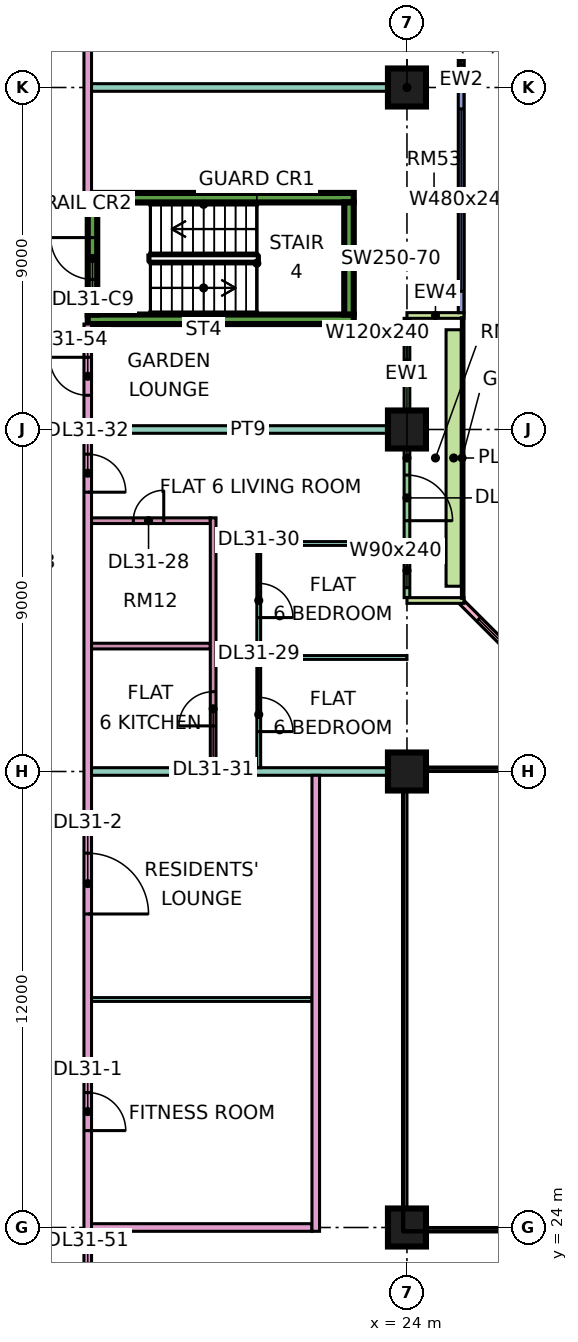
"""IFC4 building model, lengths in metres.
Left out: names, types, materials, properties, quantities, classifications, styles, units other than length and angle.
Written with IfcOpenShell. Run it as: python <this file> out.ifc"""

import sys

from ifc_helpers import new_model, si_unit, direction, frame, frame_2d, origin, origin_2d, place, context, subcontext, project, spatial, rectangle, extrude, element, fill, save


model = new_model("IFC4")
c1 = context("Model", 3, precision=1e-05, world=origin(), true_north=direction((0.0, 1.0)))
c2 = subcontext(c1, "Body", "Model", "MODEL_VIEW")
j1 = project(units=[si_unit("LENGTHUNIT", "METRE"), si_unit("PLANEANGLEUNIT", "RADIAN")], contexts=[c1])
p1 = place(None, origin())
s1 = spatial("IfcSite", under=j1, at=p1, CompositionType="ELEMENT")
p2 = place(p1, origin())
s2 = spatial("IfcBuilding", under=s1, at=p2, CompositionType="ELEMENT")
p3 = place(p2, frame((0.0, 0.0, 133.15)))
s3 = spatial("IfcBuildingStorey", under=s2, at=p3, CompositionType="ELEMENT", Elevation=133.15)
for number, where, z_axis, x_axis in (
    (1, (24.0, 24.0, 0.0), (0.0, 0.0, 1.0), (1.0, 0.0, 0.0)),
    (2, (24.0, 36.0, 0.0), (0.0, 0.0, 1.0), (1.0, 0.0, 0.0)),
    (3, (24.0, 45.0, 0.0), (0.0, 0.0, 1.0), (1.0, 0.0, 0.0)),
    (4, (24.0, 54.0, 0.0), (0.0, 0.0, 1.0), (1.0, 0.0, 0.0)),
):
    element("IfcColumn", number, at=place(p3, frame(where, z_axis=z_axis, x_axis=x_axis)), inside=s3, PredefinedType="COLUMN", context=c2, shape_type="SweptSolid", body=[
        extrude(rectangle(XDim=1.0, YDim=1.0, at=origin_2d()), origin(), (0.0, 0.0, 1.0), 3.75),
    ])
for number, where, z_axis, x_axis in (
    (5, (15.6, 47.9, 0.0), (0.0, 0.0, 1.0), (1.0, 0.0, 0.0)),
    (6, (15.6, 51.1, 0.0), (0.0, 0.0, 1.0), (1.0, 0.0, 0.0)),
):
    element("IfcWall", number, at=place(p3, frame(where, z_axis=z_axis, x_axis=x_axis)), inside=s3, PredefinedType="SHEAR", context=c2, shape_type="SweptSolid", body=[
        extrude(rectangle(XDim=7.0, YDim=0.25, at=frame_2d((3.5, 0.0))), origin(), (0.0, 0.0, 1.0), 3.75),
    ])
p4 = place(p3, frame((15.725, 48.025, 0.0), z_axis=(0.0, 0.0, 1.0), x_axis=(0.0, 1.0, 0.0)))
e7 = element("IfcWall", 7, at=p4, inside=s3, PredefinedType="SHEAR", context=c2, shape_type="SweptSolid", body=[
    extrude(rectangle(XDim=2.95, YDim=0.25, at=frame_2d((1.475, 0.0))), origin(), (0.0, 0.0, 1.0), 3.75),
])
p5 = place(p4, frame((0.925, 0.0, 0.0)))
e8 = element("IfcOpeningElement", 8, at=p5, cuts=e7, PredefinedType="OPENING", context=c2, shape_type="SweptSolid", body=[
    extrude(rectangle(XDim=1.1, YDim=2.2, at=frame_2d((0.55, 1.1))), frame((0.0, 0.135, 0.0), z_axis=(0.0, -1.0, 0.0), x_axis=(1.0, 0.0, 0.0)), (0.0, 0.0, 1.0), 0.27),
])
p6 = place(p3, frame((22.475, 48.025, 0.0), z_axis=(0.0, 0.0, 1.0), x_axis=(0.0, 1.0, 0.0)))
e9 = element("IfcWall", 9, at=p6, inside=s3, PredefinedType="SHEAR", context=c2, shape_type="SweptSolid", body=[
    extrude(rectangle(XDim=2.95, YDim=0.25, at=frame_2d((1.475, 0.0))), origin(), (0.0, 0.0, 1.0), 3.75),
])
p7 = place(p3, frame((28.447, 37.447, 0.0), z_axis=(0.0, 0.0, 1.0), x_axis=(-0.707106781187, 0.707106781187, 0.0)))
e10 = element("IfcWall", 10, at=p7, inside=s3, PredefinedType="SOLIDWALL", context=c2, shape_type="SweptSolid", body=[
    extrude(rectangle(XDim=4.243, YDim=0.15, at=frame_2d((2.121, 0.0))), origin(), (0.0, 0.0, 1.0), 3.35),
])
p8 = place(p7, frame((0.621, 0.0, 0.45)))
e11 = element("IfcOpeningElement", 11, at=p8, cuts=e10, PredefinedType="OPENING", context=c2, shape_type="SweptSolid", body=[
    extrude(rectangle(XDim=3.0, YDim=2.4, at=frame_2d((1.5, 1.2))), frame((0.0, 0.085, 0.0), z_axis=(0.0, -1.0, 0.0), x_axis=(1.0, 0.0, 0.0)), (0.0, 0.0, 1.0), 0.17),
])
p9 = place(p3, frame((24.0, 40.575, 0.0), z_axis=(0.0, 0.0, 1.0), x_axis=(0.0, 1.0, 0.0)))
e12 = element("IfcWall", 12, at=p9, inside=s3, PredefinedType="SOLIDWALL", context=c2, shape_type="SweptSolid", body=[
    extrude(rectangle(XDim=7.35, YDim=0.15, at=frame_2d((3.675, 0.0))), origin(), (0.0, 0.0, 1.0), 3.35),
])
p10 = place(p9, frame((0.262, 0.0, 0.45)))
e13 = element("IfcOpeningElement", 13, at=p10, cuts=e12, PredefinedType="OPENING", context=c2, shape_type="SweptSolid", body=[
    extrude(rectangle(XDim=0.9, YDim=2.4, at=frame_2d((0.45, 1.2))), frame((0.0, 0.085, 0.0), z_axis=(0.0, -1.0, 0.0), x_axis=(1.0, 0.0, 0.0)), (0.0, 0.0, 1.0), 0.17),
])
p11 = place(p9, frame((2.025, 0.0, 0.0)))
e14 = element("IfcOpeningElement", 14, at=p11, cuts=e12, PredefinedType="OPENING", context=c2, shape_type="SweptSolid", body=[
    extrude(rectangle(XDim=1.2, YDim=2.4, at=frame_2d((0.6, 1.2))), frame((0.0, 0.085, 0.0), z_axis=(0.0, -1.0, 0.0), x_axis=(1.0, 0.0, 0.0)), (0.0, 0.0, 1.0), 0.17),
])
p12 = place(p9, frame((5.587, 0.0, 0.45)))
e15 = element("IfcOpeningElement", 15, at=p12, cuts=e12, PredefinedType="OPENING", context=c2, shape_type="SweptSolid", body=[
    extrude(rectangle(XDim=1.2, YDim=2.4, at=frame_2d((0.6, 1.2))), frame((0.0, 0.085, 0.0), z_axis=(0.0, -1.0, 0.0), x_axis=(1.0, 0.0, 0.0)), (0.0, 0.0, 1.0), 0.17),
])
for number, where, z_axis, x_axis in (
    (16, (25.5, 40.5, 0.0), (0.0, 0.0, 1.0), (-1.0, 0.0, 0.0)),
    (17, (25.5, 48.0, 0.0), (0.0, 0.0, 1.0), (-1.0, 0.0, 0.0)),
):
    element("IfcWall", number, at=place(p3, frame(where, z_axis=z_axis, x_axis=x_axis)), inside=s3, PredefinedType="SOLIDWALL", context=c2, shape_type="SweptSolid", body=[
        extrude(rectangle(XDim=1.5, YDim=0.15, at=frame_2d((0.75, 0.0))), origin(), (0.0, 0.0, 1.0), 3.35),
    ])
p13 = place(p3, frame((25.425, 48.075, 0.0), z_axis=(0.0, 0.0, 1.0), x_axis=(0.0, 1.0, 0.0)))
e18 = element("IfcWall", 18, at=p13, inside=s3, PredefinedType="SOLIDWALL", context=c2, shape_type="SweptSolid", body=[
    extrude(rectangle(XDim=13.425, YDim=0.15, at=frame_2d((6.712, 0.0))), origin(), (0.0, 0.0, 1.0), 3.35),
])
p14 = place(p13, frame((0.562, 0.0, 0.45)))
e19 = element("IfcOpeningElement", 19, at=p14, cuts=e18, PredefinedType="OPENING", context=c2, shape_type="SweptSolid", body=[
    extrude(rectangle(XDim=4.8, YDim=2.4, at=frame_2d((2.4, 1.2))), frame((0.0, 0.085, 0.0), z_axis=(0.0, -1.0, 0.0), x_axis=(1.0, 0.0, 0.0)), (0.0, 0.0, 1.0), 0.17),
])
p15 = place(p13, frame((6.525, 0.0, 0.45)))
e20 = element("IfcOpeningElement", 20, at=p15, cuts=e18, PredefinedType="OPENING", context=c2, shape_type="SweptSolid", body=[
    extrude(rectangle(XDim=1.8, YDim=2.4, at=frame_2d((0.9, 1.2))), frame((0.0, 0.085, 0.0), z_axis=(0.0, -1.0, 0.0), x_axis=(1.0, 0.0, 0.0)), (0.0, 0.0, 1.0), 0.17),
])
p16 = place(p13, frame((9.525, 0.0, 0.45)))
e21 = element("IfcOpeningElement", 21, at=p16, cuts=e18, PredefinedType="OPENING", context=c2, shape_type="SweptSolid", body=[
    extrude(rectangle(XDim=1.8, YDim=2.4, at=frame_2d((0.9, 1.2))), frame((0.0, 0.085, 0.0), z_axis=(0.0, -1.0, 0.0), x_axis=(1.0, 0.0, 0.0)), (0.0, 0.0, 1.0), 0.17),
])
p17 = place(p13, frame((12.225, 0.0, 0.45)))
e22 = element("IfcOpeningElement", 22, at=p17, cuts=e18, PredefinedType="OPENING", context=c2, shape_type="SweptSolid", body=[
    extrude(rectangle(XDim=0.9, YDim=2.4, at=frame_2d((0.45, 1.2))), frame((0.0, 0.085, 0.0), z_axis=(0.0, -1.0, 0.0), x_axis=(1.0, 0.0, 0.0)), (0.0, 0.0, 1.0), 0.17),
])
p18 = place(p3, frame((25.229, 40.875, 0.0), z_axis=(0.0, 0.0, 1.0), x_axis=(0.0, 1.0, 0.0)))
e23 = element("IfcWall", 23, at=p18, inside=s3, PredefinedType="SOLIDWALL", context=c2, shape_type="SweptSolid", body=[
    extrude(rectangle(XDim=6.75, YDim=0.4, at=frame_2d((3.375, 0.0))), origin(), (0.0, 0.0, 1.0), 0.7),
])
p19 = place(p3, frame((15.6, 20.0, 0.0), z_axis=(0.0, 0.0, 1.0), x_axis=(0.0, 1.0, 0.0)))
e24 = element("IfcWall", 24, at=p19, inside=s3, PredefinedType="PARTITIONING", context=c2, shape_type="SweptSolid", body=[
    extrude(rectangle(XDim=27.775, YDim=0.2, at=frame_2d((13.887, 0.0))), origin(), (0.0, 0.0, 1.0), 3.35),
])
p20 = place(p19, frame((6.55, 0.0, 0.0)))
e25 = element("IfcOpeningElement", 25, at=p20, cuts=e24, PredefinedType="OPENING", context=c2, shape_type="SweptSolid", body=[
    extrude(rectangle(XDim=1.0, YDim=2.1, at=frame_2d((0.5, 1.05))), frame((0.0, 0.11, 0.0), z_axis=(0.0, -1.0, 0.0), x_axis=(1.0, 0.0, 0.0)), (0.0, 0.0, 1.0), 0.22),
])
p21 = place(p19, frame((12.25, 0.0, 0.0)))
e26 = element("IfcOpeningElement", 26, at=p21, cuts=e24, PredefinedType="OPENING", context=c2, shape_type="SweptSolid", body=[
    extrude(rectangle(XDim=1.6, YDim=2.1, at=frame_2d((0.8, 1.05))), frame((0.0, 0.11, 0.0), z_axis=(0.0, -1.0, 0.0), x_axis=(1.0, 0.0, 0.0)), (0.0, 0.0, 1.0), 0.22),
])
p22 = place(p19, frame((23.35, 0.0, 0.0)))
e27 = element("IfcOpeningElement", 27, at=p22, cuts=e24, PredefinedType="OPENING", context=c2, shape_type="SweptSolid", body=[
    extrude(rectangle(XDim=1.0, YDim=2.1, at=frame_2d((0.5, 1.05))), frame((0.0, 0.11, 0.0), z_axis=(0.0, -1.0, 0.0), x_axis=(1.0, 0.0, 0.0)), (0.0, 0.0, 1.0), 0.22),
])
p23 = place(p19, frame((1.15, 0.0, 0.0)))
e28 = element("IfcOpeningElement", 28, at=p23, cuts=e24, PredefinedType="OPENING", context=c2, shape_type="SweptSolid", body=[
    extrude(rectangle(XDim=1.8, YDim=2.1, at=frame_2d((0.9, 1.05))), frame((0.0, 0.11, 0.0), z_axis=(0.0, -1.0, 0.0), x_axis=(1.0, 0.0, 0.0)), (0.0, 0.0, 1.0), 0.22),
])
p24 = place(p19, frame((25.9, 0.0, 0.0)))
e29 = element("IfcOpeningElement", 29, at=p24, cuts=e24, PredefinedType="OPENING", context=c2, shape_type="SweptSolid", body=[
    extrude(rectangle(XDim=1.0, YDim=2.1, at=frame_2d((0.5, 1.05))), frame((0.0, 0.11, 0.0), z_axis=(0.0, -1.0, 0.0), x_axis=(1.0, 0.0, 0.0)), (0.0, 0.0, 1.0), 0.22),
])
p25 = place(p3, frame((15.6, 51.225, 0.0), z_axis=(0.0, 0.0, 1.0), x_axis=(0.0, 1.0, 0.0)))
e30 = element("IfcWall", 30, at=p25, inside=s3, PredefinedType="PARTITIONING", context=c2, shape_type="SweptSolid", body=[
    extrude(rectangle(XDim=11.701, YDim=0.2, at=frame_2d((5.851, 0.0))), origin(), (0.0, 0.0, 1.0), 3.35),
])
p26 = place(p25, frame((3.825, 0.0, 0.0)))
e31 = element("IfcOpeningElement", 31, at=p26, cuts=e30, PredefinedType="OPENING", context=c2, shape_type="SweptSolid", body=[
    extrude(rectangle(XDim=1.0, YDim=2.1, at=frame_2d((0.5, 1.05))), frame((0.0, 0.11, 0.0), z_axis=(0.0, -1.0, 0.0), x_axis=(1.0, 0.0, 0.0)), (0.0, 0.0, 1.0), 0.22),
])
p27 = place(p3, frame((15.7, 24.0, 0.0), z_axis=(0.0, 0.0, 1.0), x_axis=(1.0, 0.0, 0.0)))
e32 = element("IfcWall", 32, at=p27, inside=s3, PredefinedType="PARTITIONING", context=c2, shape_type="SweptSolid", body=[
    extrude(rectangle(XDim=5.8, YDim=0.2, at=frame_2d((2.9, 0.0))), origin(), (0.0, 0.0, 1.0), 3.35),
])
p28 = place(p3, frame((15.7, 30.0, 0.0), z_axis=(0.0, 0.0, 1.0), x_axis=(1.0, 0.0, 0.0)))
e33 = element("IfcWall", 33, at=p28, inside=s3, PredefinedType="PARTITIONING", context=c2, shape_type="SweptSolid", body=[
    extrude(rectangle(XDim=5.8, YDim=0.1, at=frame_2d((2.9, 0.0))), origin(), (0.0, 0.0, 1.0), 3.35),
])
p29 = place(p3, frame((15.7, 36.0, 0.0), z_axis=(0.0, 0.0, 1.0), x_axis=(1.0, 0.0, 0.0)))
e34 = element("IfcWall", 34, at=p29, inside=s3, PredefinedType="PARTITIONING", context=c2, shape_type="SweptSolid", body=[
    extrude(rectangle(XDim=8.3, YDim=0.2, at=frame_2d((4.15, 0.0))), origin(), (0.0, 0.0, 1.0), 3.35),
])
p30 = place(p3, frame((15.7, 39.3, 0.0), z_axis=(0.0, 0.0, 1.0), x_axis=(1.0, 0.0, 0.0)))
e35 = element("IfcWall", 35, at=p30, inside=s3, PredefinedType="PARTITIONING", context=c2, shape_type="SweptSolid", body=[
    extrude(rectangle(XDim=3.125, YDim=0.15, at=frame_2d((1.562, 0.0))), origin(), (0.0, 0.0, 1.0), 3.35),
])
p31 = place(p3, frame((15.7, 42.6, 0.0), z_axis=(0.0, 0.0, 1.0), x_axis=(1.0, 0.0, 0.0)))
e36 = element("IfcWall", 36, at=p31, inside=s3, PredefinedType="PARTITIONING", context=c2, shape_type="SweptSolid", body=[
    extrude(rectangle(XDim=3.125, YDim=0.15, at=frame_2d((1.562, 0.0))), origin(), (0.0, 0.0, 1.0), 3.35),
])
p32 = place(p31, frame((1.1, 0.0, 0.0)))
e37 = element("IfcOpeningElement", 37, at=p32, cuts=e36, PredefinedType="OPENING", context=c2, shape_type="SweptSolid", body=[
    extrude(rectangle(XDim=0.8, YDim=2.1, at=frame_2d((0.4, 1.05))), frame((0.0, 0.085, 0.0), z_axis=(0.0, -1.0, 0.0), x_axis=(1.0, 0.0, 0.0)), (0.0, 0.0, 1.0), 0.17),
])
p33 = place(p3, frame((15.7, 45.0, 0.0), z_axis=(0.0, 0.0, 1.0), x_axis=(1.0, 0.0, 0.0)))
e38 = element("IfcWall", 38, at=p33, inside=s3, PredefinedType="PARTITIONING", context=c2, shape_type="SweptSolid", body=[
    extrude(rectangle(XDim=8.226, YDim=0.2, at=frame_2d((4.113, 0.0))), origin(), (0.0, 0.0, 1.0), 3.35),
])
p34 = place(p3, frame((15.7, 54.0, 0.0), z_axis=(0.0, 0.0, 1.0), x_axis=(1.0, 0.0, 0.0)))
e39 = element("IfcWall", 39, at=p34, inside=s3, PredefinedType="PARTITIONING", context=c2, shape_type="SweptSolid", body=[
    extrude(rectangle(XDim=8.3, YDim=0.2, at=frame_2d((4.15, 0.0))), origin(), (0.0, 0.0, 1.0), 3.35),
])
p35 = place(p3, frame((18.9, 36.1, 0.0), z_axis=(0.0, 0.0, 1.0), x_axis=(0.0, 1.0, 0.0)))
e40 = element("IfcWall", 40, at=p35, inside=s3, PredefinedType="PARTITIONING", context=c2, shape_type="SweptSolid", body=[
    extrude(rectangle(XDim=6.575, YDim=0.15, at=frame_2d((3.288, 0.0))), origin(), (0.0, 0.0, 1.0), 3.35),
])
p36 = place(p35, frame((1.1, 0.0, 0.0)))
e41 = element("IfcOpeningElement", 41, at=p36, cuts=e40, PredefinedType="OPENING", context=c2, shape_type="SweptSolid", body=[
    extrude(rectangle(XDim=0.9, YDim=2.1, at=frame_2d((0.45, 1.05))), frame((0.0, 0.085, 0.0), z_axis=(0.0, -1.0, 0.0), x_axis=(1.0, 0.0, 0.0)), (0.0, 0.0, 1.0), 0.17),
])
p37 = place(p3, frame((20.1, 36.1, 0.0), z_axis=(0.0, 0.0, 1.0), x_axis=(0.0, 1.0, 0.0)))
e42 = element("IfcWall", 42, at=p37, inside=s3, PredefinedType="PARTITIONING", context=c2, shape_type="SweptSolid", body=[
    extrude(rectangle(XDim=5.95, YDim=0.1, at=frame_2d((2.975, 0.0))), origin(), (0.0, 0.0, 1.0), 3.35),
])
p38 = place(p37, frame((0.95, 0.0, 0.0)))
e43 = element("IfcOpeningElement", 43, at=p38, cuts=e42, PredefinedType="OPENING", context=c2, shape_type="SweptSolid", body=[
    extrude(rectangle(XDim=0.9, YDim=2.1, at=frame_2d((0.45, 1.05))), frame((0.0, 0.06, 0.0), z_axis=(0.0, -1.0, 0.0), x_axis=(1.0, 0.0, 0.0)), (0.0, 0.0, 1.0), 0.12),
])
p39 = place(p37, frame((3.95, 0.0, 0.0)))
e44 = element("IfcOpeningElement", 44, at=p39, cuts=e42, PredefinedType="OPENING", context=c2, shape_type="SweptSolid", body=[
    extrude(rectangle(XDim=0.9, YDim=2.1, at=frame_2d((0.45, 1.05))), frame((0.0, 0.06, 0.0), z_axis=(0.0, -1.0, 0.0), x_axis=(1.0, 0.0, 0.0)), (0.0, 0.0, 1.0), 0.12),
])
p40 = place(p3, frame((20.15, 39.0, 0.0), z_axis=(0.0, 0.0, 1.0), x_axis=(1.0, 0.0, 0.0)))
e45 = element("IfcWall", 45, at=p40, inside=s3, PredefinedType="PARTITIONING", context=c2, shape_type="SweptSolid", body=[
    extrude(rectangle(XDim=3.85, YDim=0.1, at=frame_2d((1.925, 0.0))), origin(), (0.0, 0.0, 1.0), 3.35),
])
p41 = place(p3, frame((20.15, 42.0, 0.0), z_axis=(0.0, 0.0, 1.0), x_axis=(1.0, 0.0, 0.0)))
e46 = element("IfcWall", 46, at=p41, inside=s3, PredefinedType="PARTITIONING", context=c2, shape_type="SweptSolid", body=[
    extrude(rectangle(XDim=3.776, YDim=0.1, at=frame_2d((1.888, 0.0))), origin(), (0.0, 0.0, 1.0), 3.35),
])
p42 = place(p3, frame((21.6, 23.9, 0.0), z_axis=(0.0, 0.0, 1.0), x_axis=(0.0, 1.0, 0.0)))
e47 = element("IfcWall", 47, at=p42, inside=s3, PredefinedType="PARTITIONING", context=c2, shape_type="SweptSolid", body=[
    extrude(rectangle(XDim=12.0, YDim=0.2, at=frame_2d((6.0, 0.0))), origin(), (0.0, 0.0, 1.0), 3.35),
])
p43 = place(p8, origin())
e48 = element("IfcWindow", 48, at=p43, inside=s3, PartitioningType="SINGLE_PANEL", PredefinedType="WINDOW", context=c2, shape_type="SweptSolid", body=[
    extrude(rectangle(XDim=3.0, YDim=2.4, at=frame_2d((1.5, 1.2))), frame((0.0, 0.03, 0.0), z_axis=(0.0, -1.0, 0.0), x_axis=(1.0, 0.0, 0.0)), (0.0, 0.0, 1.0), 0.06),
])
fill(e11, e48)
p44 = place(p10, origin())
e49 = element("IfcWindow", 49, at=p44, inside=s3, PartitioningType="SINGLE_PANEL", PredefinedType="WINDOW", context=c2, shape_type="SweptSolid", body=[
    extrude(rectangle(XDim=0.9, YDim=2.4, at=frame_2d((0.45, 1.2))), frame((0.0, 0.03, 0.0), z_axis=(0.0, -1.0, 0.0), x_axis=(1.0, 0.0, 0.0)), (0.0, 0.0, 1.0), 0.06),
])
fill(e13, e49)
p45 = place(p11, frame((1.2, 0.0, 0.0), z_axis=(0.0, 0.0, 1.0), x_axis=(-1.0, 0.0, 0.0)))
e50 = element("IfcDoor", 50, at=p45, inside=s3, OperationType="DOUBLE_DOOR_SINGLE_SWING", PredefinedType="DOOR", context=c2, shape_type="SweptSolid", body=[
    extrude(rectangle(XDim=1.2, YDim=2.4, at=frame_2d((0.6, 1.2))), frame((0.0, 0.025, 0.0), z_axis=(0.0, -1.0, 0.0), x_axis=(1.0, 0.0, 0.0)), (0.0, 0.0, 1.0), 0.05),
])
fill(e14, e50)
p46 = place(p12, origin())
e51 = element("IfcWindow", 51, at=p46, inside=s3, PartitioningType="SINGLE_PANEL", PredefinedType="WINDOW", context=c2, shape_type="SweptSolid", body=[
    extrude(rectangle(XDim=1.2, YDim=2.4, at=frame_2d((0.6, 1.2))), frame((0.0, 0.03, 0.0), z_axis=(0.0, -1.0, 0.0), x_axis=(1.0, 0.0, 0.0)), (0.0, 0.0, 1.0), 0.06),
])
fill(e15, e51)
p47 = place(p14, origin())
e52 = element("IfcWindow", 52, at=p47, inside=s3, PartitioningType="SINGLE_PANEL", PredefinedType="WINDOW", context=c2, shape_type="SweptSolid", body=[
    extrude(rectangle(XDim=4.8, YDim=2.4, at=frame_2d((2.4, 1.2))), frame((0.0, 0.03, 0.0), z_axis=(0.0, -1.0, 0.0), x_axis=(1.0, 0.0, 0.0)), (0.0, 0.0, 1.0), 0.06),
])
fill(e19, e52)
p48 = place(p15, origin())
e53 = element("IfcWindow", 53, at=p48, inside=s3, PartitioningType="SINGLE_PANEL", PredefinedType="WINDOW", context=c2, shape_type="SweptSolid", body=[
    extrude(rectangle(XDim=1.8, YDim=2.4, at=frame_2d((0.9, 1.2))), frame((0.0, 0.03, 0.0), z_axis=(0.0, -1.0, 0.0), x_axis=(1.0, 0.0, 0.0)), (0.0, 0.0, 1.0), 0.06),
])
fill(e20, e53)
p49 = place(p5, frame((1.1, 0.0, 0.0), z_axis=(0.0, 0.0, 1.0), x_axis=(-1.0, 0.0, 0.0)))
e54 = element("IfcDoor", 54, at=p49, inside=s3, OperationType="SINGLE_SWING_RIGHT", PredefinedType="DOOR", context=c2, shape_type="SweptSolid", body=[
    extrude(rectangle(XDim=1.1, YDim=2.2, at=frame_2d((0.55, 1.1))), frame((0.0, 0.025, 0.0), z_axis=(0.0, -1.0, 0.0), x_axis=(1.0, 0.0, 0.0)), (0.0, 0.0, 1.0), 0.05),
])
fill(e8, e54)
p50 = place(p20, frame((1.0, 0.0, 0.0), z_axis=(0.0, 0.0, 1.0), x_axis=(-1.0, 0.0, 0.0)))
e55 = element("IfcDoor", 55, at=p50, inside=s3, OperationType="SINGLE_SWING_LEFT", PredefinedType="DOOR", context=c2, shape_type="SweptSolid", body=[
    extrude(rectangle(XDim=1.0, YDim=2.1, at=frame_2d((0.5, 1.05))), frame((0.0, 0.025, 0.0), z_axis=(0.0, -1.0, 0.0), x_axis=(1.0, 0.0, 0.0)), (0.0, 0.0, 1.0), 0.05),
])
fill(e25, e55)
p51 = place(p21, frame((1.6, 0.0, 0.0), z_axis=(0.0, 0.0, 1.0), x_axis=(-1.0, 0.0, 0.0)))
e56 = element("IfcDoor", 56, at=p51, inside=s3, OperationType="DOUBLE_DOOR_SINGLE_SWING", PredefinedType="DOOR", context=c2, shape_type="SweptSolid", body=[
    extrude(rectangle(XDim=1.6, YDim=2.1, at=frame_2d((0.8, 1.05))), frame((0.0, 0.025, 0.0), z_axis=(0.0, -1.0, 0.0), x_axis=(1.0, 0.0, 0.0)), (0.0, 0.0, 1.0), 0.05),
])
fill(e26, e56)
p52 = place(p32, frame((0.8, 0.0, 0.0), z_axis=(0.0, 0.0, 1.0), x_axis=(-1.0, 0.0, 0.0)))
e57 = element("IfcDoor", 57, at=p52, inside=s3, OperationType="SINGLE_SWING_RIGHT", PredefinedType="DOOR", context=c2, shape_type="SweptSolid", body=[
    extrude(rectangle(XDim=0.8, YDim=2.1, at=frame_2d((0.4, 1.05))), frame((0.0, 0.025, 0.0), z_axis=(0.0, -1.0, 0.0), x_axis=(1.0, 0.0, 0.0)), (0.0, 0.0, 1.0), 0.05),
])
fill(e37, e57)
p53 = place(p38, frame((0.9, 0.0, 0.0), z_axis=(0.0, 0.0, 1.0), x_axis=(-1.0, 0.0, 0.0)))
e58 = element("IfcDoor", 58, at=p53, inside=s3, OperationType="SINGLE_SWING_LEFT", PredefinedType="DOOR", context=c2, shape_type="SweptSolid", body=[
    extrude(rectangle(XDim=0.9, YDim=2.1, at=frame_2d((0.45, 1.05))), frame((0.0, 0.025, 0.0), z_axis=(0.0, -1.0, 0.0), x_axis=(1.0, 0.0, 0.0)), (0.0, 0.0, 1.0), 0.05),
])
fill(e43, e58)
p54 = place(p39, frame((0.9, 0.0, 0.0), z_axis=(0.0, 0.0, 1.0), x_axis=(-1.0, 0.0, 0.0)))
e59 = element("IfcDoor", 59, at=p54, inside=s3, OperationType="SINGLE_SWING_LEFT", PredefinedType="DOOR", context=c2, shape_type="SweptSolid", body=[
    extrude(rectangle(XDim=0.9, YDim=2.1, at=frame_2d((0.45, 1.05))), frame((0.0, 0.025, 0.0), z_axis=(0.0, -1.0, 0.0), x_axis=(1.0, 0.0, 0.0)), (0.0, 0.0, 1.0), 0.05),
])
fill(e44, e59)
p55 = place(p36, origin())
e60 = element("IfcDoor", 60, at=p55, inside=s3, OperationType="SINGLE_SWING_LEFT", PredefinedType="DOOR", context=c2, shape_type="SweptSolid", body=[
    extrude(rectangle(XDim=0.9, YDim=2.1, at=frame_2d((0.45, 1.05))), frame((0.0, 0.025, 0.0), z_axis=(0.0, -1.0, 0.0), x_axis=(1.0, 0.0, 0.0)), (0.0, 0.0, 1.0), 0.05),
])
fill(e41, e60)
p56 = place(p22, frame((1.0, 0.0, 0.0), z_axis=(0.0, 0.0, 1.0), x_axis=(-1.0, 0.0, 0.0)))
e61 = element("IfcDoor", 61, at=p56, inside=s3, OperationType="SINGLE_SWING_LEFT", PredefinedType="DOOR", context=c2, shape_type="SweptSolid", body=[
    extrude(rectangle(XDim=1.0, YDim=2.1, at=frame_2d((0.5, 1.05))), frame((0.0, 0.025, 0.0), z_axis=(0.0, -1.0, 0.0), x_axis=(1.0, 0.0, 0.0)), (0.0, 0.0, 1.0), 0.05),
])
fill(e27, e61)
p57 = place(p24, frame((1.0, 0.0, 0.0), z_axis=(0.0, 0.0, 1.0), x_axis=(-1.0, 0.0, 0.0)))
e62 = element("IfcDoor", 62, at=p57, inside=s3, OperationType="SINGLE_SWING_RIGHT", PredefinedType="DOOR", context=c2, shape_type="SweptSolid", body=[
    extrude(rectangle(XDim=1.0, YDim=2.1, at=frame_2d((0.5, 1.05))), frame((0.0, 0.025, 0.0), z_axis=(0.0, -1.0, 0.0), x_axis=(1.0, 0.0, 0.0)), (0.0, 0.0, 1.0), 0.05),
])
fill(e29, e62)
save(model, sys.argv[1])
